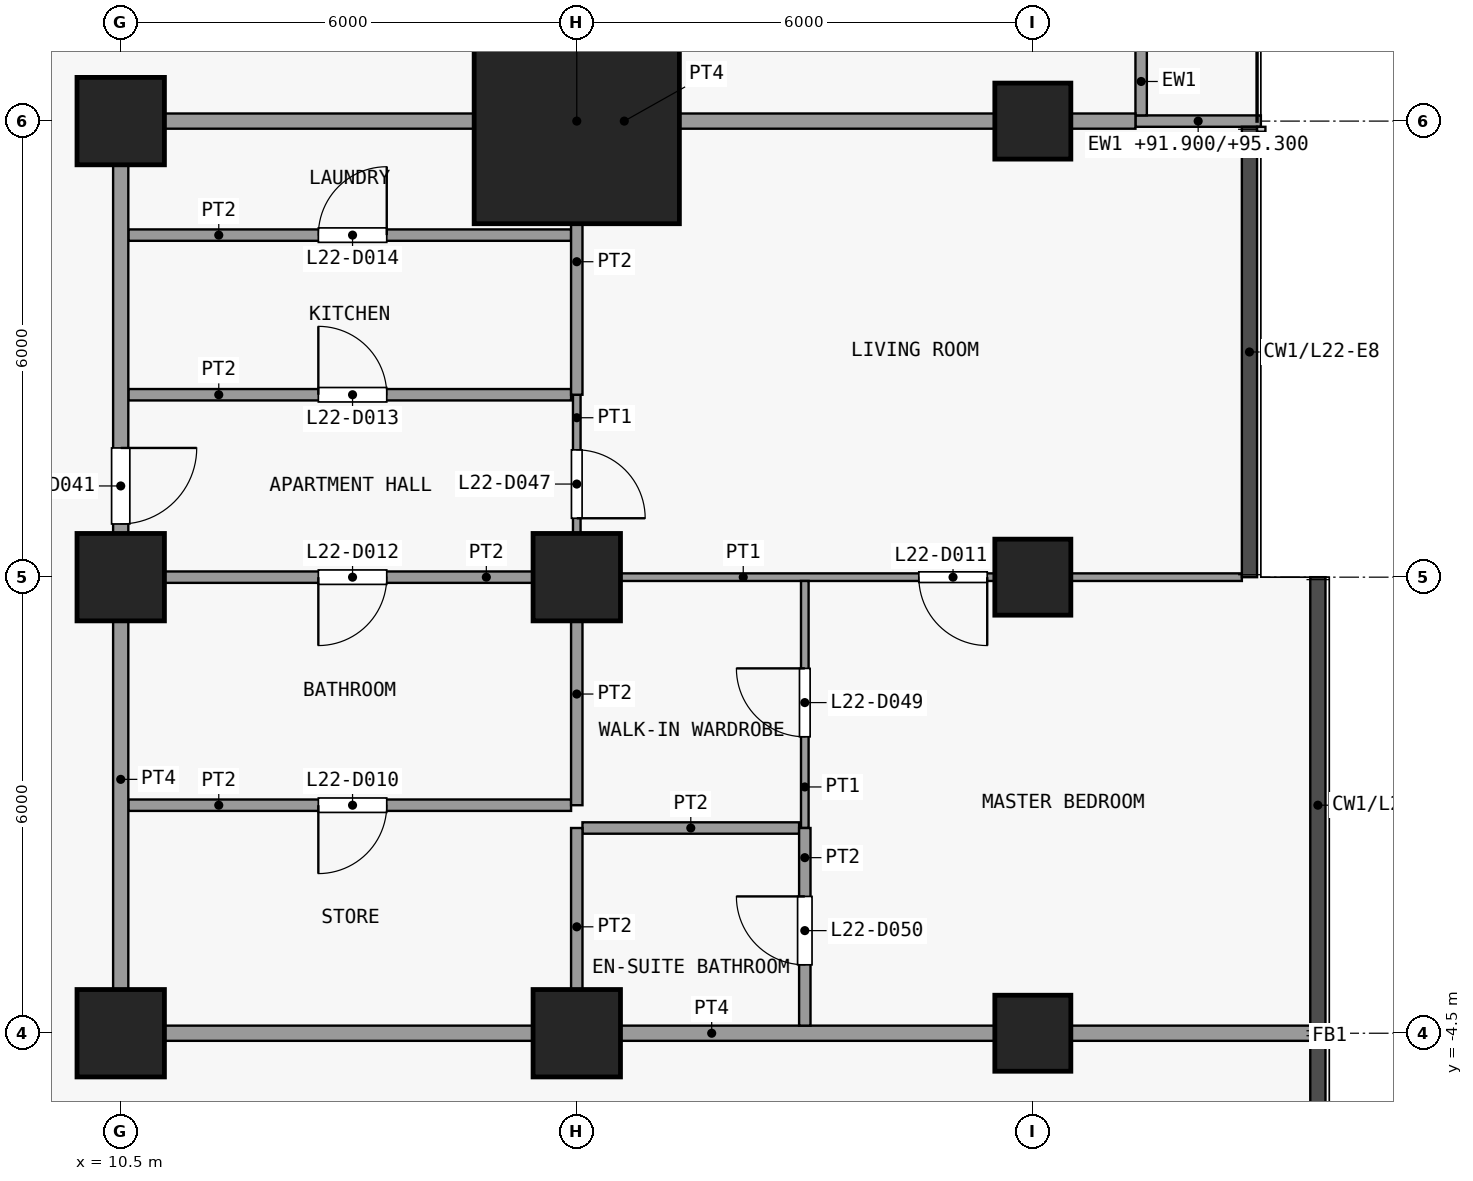
"""IFC4 building model, lengths in metres.
Left out: names, types, materials, properties, quantities, classifications, styles, units other than length and angle.
Written with IfcOpenShell. Run it as: python <this file> out.ifc"""

import sys

from ifc_helpers import new_model, si_unit, direction, frame, frame_2d, origin, origin_2d, place, context, subcontext, project, spatial, rectangle, extrude, element, fill, save


model = new_model("IFC4")
c1 = context("Model", 3, precision=1e-05, world=origin(), true_north=direction((0.0, 1.0)))
c2 = subcontext(c1, "Body", "Model", "MODEL_VIEW")
j1 = project(units=[si_unit("LENGTHUNIT", "METRE"), si_unit("PLANEANGLEUNIT", "RADIAN")], contexts=[c1])
p1 = place(None, origin())
s1 = spatial("IfcSite", under=j1, at=p1, CompositionType="ELEMENT")
p2 = place(p1, origin())
s2 = spatial("IfcBuilding", under=s1, at=p2, CompositionType="ELEMENT")
p3 = place(p2, frame((0.0, 0.0, 91.9)))
s3 = spatial("IfcBuildingStorey", under=s2, at=p3, CompositionType="ELEMENT", Elevation=91.9)
for number, where, z_axis, x_axis in (
    (1, (10.5, -4.5, 0.0), (0.0, 0.0, 1.0), (1.0, 0.0, 0.0)),
    (2, (10.5, 1.5, 0.0), (0.0, 0.0, 1.0), (1.0, 0.0, 0.0)),
    (3, (10.5, 7.5, 0.0), (0.0, 0.0, 1.0), (1.0, 0.0, 0.0)),
    (4, (16.5, -4.5, 0.0), (0.0, 0.0, 1.0), (1.0, 0.0, 0.0)),
    (5, (16.5, 1.5, 0.0), (0.0, 0.0, 1.0), (1.0, 0.0, 0.0)),
):
    element("IfcColumn", number, at=place(p3, frame(where, z_axis=z_axis, x_axis=x_axis)), inside=s3, PredefinedType="COLUMN", context=c2, shape_type="SweptSolid", body=[
        extrude(rectangle(XDim=1.15, YDim=1.15, at=origin_2d()), origin(), (0.0, 0.0, 1.0), 3.6),
    ])
p4 = place(p3, frame((16.5, 7.5, 0.0), z_axis=(0.0, 0.0, 1.0), x_axis=(1.0, 0.0, 0.0)))
e6 = element("IfcColumn", 6, at=p4, inside=s3, PredefinedType="COLUMN", context=c2, shape_type="SweptSolid", body=[
    extrude(rectangle(XDim=2.7, YDim=2.7, at=origin_2d()), origin(), (0.0, 0.0, 1.0), 3.6),
])
for number, where, z_axis, x_axis in (
    (7, (22.5, -4.5, 0.0), (0.0, 0.0, 1.0), (1.0, 0.0, 0.0)),
    (8, (22.5, 1.5, 0.0), (0.0, 0.0, 1.0), (1.0, 0.0, 0.0)),
    (9, (22.5, 7.5, 0.0), (0.0, 0.0, 1.0), (1.0, 0.0, 0.0)),
):
    element("IfcColumn", number, at=place(p3, frame(where, z_axis=z_axis, x_axis=x_axis)), inside=s3, PredefinedType="COLUMN", context=c2, shape_type="SweptSolid", body=[
        extrude(rectangle(XDim=1.0, YDim=1.0, at=origin_2d()), origin(), (0.0, 0.0, 1.0), 3.6),
    ])
p5 = place(p3, frame((23.85, 7.5, 0.0), z_axis=(0.0, 0.0, 1.0), x_axis=(1.0, 0.0, 0.0)))
e10 = element("IfcWall", 10, at=p5, inside=s3, PredefinedType="SOLIDWALL", context=c2, shape_type="SweptSolid", body=[
    extrude(rectangle(XDim=1.65, YDim=0.15, at=frame_2d((0.825, 0.0))), origin(), (0.0, 0.0, 1.0), 3.4),
])
p6 = place(p3, frame((23.925, 13.425, 0.0), z_axis=(0.0, 0.0, 1.0), x_axis=(0.0, -1.0, 0.0)))
e11 = element("IfcWall", 11, at=p6, inside=s3, PredefinedType="SOLIDWALL", context=c2, shape_type="SweptSolid", body=[
    extrude(rectangle(XDim=5.85, YDim=0.15, at=frame_2d((2.925, 0.0))), origin(), (0.0, 0.0, 1.0), 3.3),
])
p7 = place(p6, frame((0.825, 0.0, 0.0)))
e12 = element("IfcOpeningElement", 12, at=p7, cuts=e11, PredefinedType="OPENING", context=c2, shape_type="SweptSolid", body=[
    extrude(rectangle(XDim=1.2, YDim=2.4, at=frame_2d((0.6, 1.2))), frame((0.0, 0.085, 0.0), z_axis=(0.0, -1.0, 0.0), x_axis=(1.0, 0.0, 0.0)), (0.0, 0.0, 1.0), 0.17),
])
p8 = place(p6, frame((3.038, 0.0, 0.9)))
e13 = element("IfcOpeningElement", 13, at=p8, cuts=e11, PredefinedType="OPENING", context=c2, shape_type="SweptSolid", body=[
    extrude(rectangle(XDim=1.8, YDim=2.1, at=frame_2d((0.9, 1.05))), frame((0.0, 0.085, 0.0), z_axis=(0.0, -1.0, 0.0), x_axis=(1.0, 0.0, 0.0)), (0.0, 0.0, 1.0), 0.17),
])
p9 = place(p3, frame((10.4, -4.5, 0.0), z_axis=(0.0, 0.0, 1.0), x_axis=(1.0, 0.0, 0.0)))
e14 = element("IfcWall", 14, at=p9, inside=s3, PredefinedType="PARTITIONING", context=c2, shape_type="SweptSolid", body=[
    extrude(rectangle(XDim=15.75, YDim=0.2, at=frame_2d((7.875, 0.0))), origin(), (0.0, 0.0, 1.0), 3.3),
])
p10 = place(p3, frame((16.575, -1.8, 0.0), z_axis=(0.0, 0.0, 1.0), x_axis=(1.0, 0.0, 0.0)))
e15 = element("IfcWall", 15, at=p10, inside=s3, PredefinedType="PARTITIONING", context=c2, shape_type="SweptSolid", body=[
    extrude(rectangle(XDim=2.85, YDim=0.15, at=frame_2d((1.425, 0.0))), origin(), (0.0, 0.0, 1.0), 3.3),
])
p11 = place(p3, frame((10.6, -1.5, 0.0), z_axis=(0.0, 0.0, 1.0), x_axis=(1.0, 0.0, 0.0)))
e16 = element("IfcWall", 16, at=p11, inside=s3, PredefinedType="PARTITIONING", context=c2, shape_type="SweptSolid", body=[
    extrude(rectangle(XDim=5.825, YDim=0.15, at=frame_2d((2.913, 0.0))), origin(), (0.0, 0.0, 1.0), 3.3),
])
p12 = place(p11, frame((2.5, 0.0, 0.0)))
e17 = element("IfcOpeningElement", 17, at=p12, cuts=e16, PredefinedType="OPENING", context=c2, shape_type="SweptSolid", body=[
    extrude(rectangle(XDim=0.9, YDim=2.1, at=frame_2d((0.45, 1.05))), frame((0.0, 0.085, 0.0), z_axis=(0.0, -1.0, 0.0), x_axis=(1.0, 0.0, 0.0)), (0.0, 0.0, 1.0), 0.17),
])
p13 = place(p3, frame((16.5, 1.5, 0.0), z_axis=(0.0, 0.0, 1.0), x_axis=(1.0, 0.0, 0.0)))
e18 = element("IfcWall", 18, at=p13, inside=s3, PredefinedType="PARTITIONING", context=c2, shape_type="SweptSolid", body=[
    extrude(rectangle(XDim=8.75, YDim=0.1, at=frame_2d((4.375, 0.0))), origin(), (0.0, 0.0, 1.0), 3.3),
])
p14 = place(p13, frame((4.5, 0.0, 0.0)))
e19 = element("IfcOpeningElement", 19, at=p14, cuts=e18, PredefinedType="OPENING", context=c2, shape_type="SweptSolid", body=[
    extrude(rectangle(XDim=0.9, YDim=2.1, at=frame_2d((0.45, 1.05))), frame((0.0, 0.06, 0.0), z_axis=(0.0, -1.0, 0.0), x_axis=(1.0, 0.0, 0.0)), (0.0, 0.0, 1.0), 0.12),
])
p15 = place(p3, frame((10.6, 1.5, 0.0), z_axis=(0.0, 0.0, 1.0), x_axis=(1.0, 0.0, 0.0)))
e20 = element("IfcWall", 20, at=p15, inside=s3, PredefinedType="PARTITIONING", context=c2, shape_type="SweptSolid", body=[
    extrude(rectangle(XDim=5.9, YDim=0.15, at=frame_2d((2.95, 0.0))), origin(), (0.0, 0.0, 1.0), 3.3),
])
p16 = place(p15, frame((2.5, 0.0, 0.0)))
e21 = element("IfcOpeningElement", 21, at=p16, cuts=e20, PredefinedType="OPENING", context=c2, shape_type="SweptSolid", body=[
    extrude(rectangle(XDim=0.9, YDim=2.1, at=frame_2d((0.45, 1.05))), frame((0.0, 0.085, 0.0), z_axis=(0.0, -1.0, 0.0), x_axis=(1.0, 0.0, 0.0)), (0.0, 0.0, 1.0), 0.17),
])
p17 = place(p3, frame((10.6, 3.9, 0.0), z_axis=(0.0, 0.0, 1.0), x_axis=(1.0, 0.0, 0.0)))
e22 = element("IfcWall", 22, at=p17, inside=s3, PredefinedType="PARTITIONING", context=c2, shape_type="SweptSolid", body=[
    extrude(rectangle(XDim=5.825, YDim=0.15, at=frame_2d((2.913, 0.0))), origin(), (0.0, 0.0, 1.0), 3.3),
])
p18 = place(p17, frame((2.5, 0.0, 0.0)))
e23 = element("IfcOpeningElement", 23, at=p18, cuts=e22, PredefinedType="OPENING", context=c2, shape_type="SweptSolid", body=[
    extrude(rectangle(XDim=0.9, YDim=2.1, at=frame_2d((0.45, 1.05))), frame((0.0, 0.085, 0.0), z_axis=(0.0, -1.0, 0.0), x_axis=(1.0, 0.0, 0.0)), (0.0, 0.0, 1.0), 0.17),
])
p19 = place(p3, frame((10.6, 6.0, 0.0), z_axis=(0.0, 0.0, 1.0), x_axis=(1.0, 0.0, 0.0)))
e24 = element("IfcWall", 24, at=p19, inside=s3, PredefinedType="PARTITIONING", context=c2, shape_type="SweptSolid", body=[
    extrude(rectangle(XDim=5.825, YDim=0.15, at=frame_2d((2.913, 0.0))), origin(), (0.0, 0.0, 1.0), 3.3),
])
p20 = place(p19, frame((2.5, 0.0, 0.0)))
e25 = element("IfcOpeningElement", 25, at=p20, cuts=e24, PredefinedType="OPENING", context=c2, shape_type="SweptSolid", body=[
    extrude(rectangle(XDim=0.9, YDim=2.1, at=frame_2d((0.45, 1.05))), frame((0.0, 0.085, 0.0), z_axis=(0.0, -1.0, 0.0), x_axis=(1.0, 0.0, 0.0)), (0.0, 0.0, 1.0), 0.17),
])
p21 = place(p3, frame((10.4, 7.5, 0.0), z_axis=(0.0, 0.0, 1.0), x_axis=(1.0, 0.0, 0.0)))
e26 = element("IfcWall", 26, at=p21, inside=s3, PredefinedType="PARTITIONING", context=c2, shape_type="SweptSolid", body=[
    extrude(rectangle(XDim=13.45, YDim=0.2, at=frame_2d((6.725, 0.0))), origin(), (0.0, 0.0, 1.0), 3.3),
])
p22 = place(p3, frame((10.5, -4.4, 0.0), z_axis=(0.0, 0.0, 1.0), x_axis=(0.0, 1.0, 0.0)))
e27 = element("IfcWall", 27, at=p22, inside=s3, PredefinedType="PARTITIONING", context=c2, shape_type="SweptSolid", body=[
    extrude(rectangle(XDim=11.8, YDim=0.2, at=frame_2d((5.9, 0.0))), origin(), (0.0, 0.0, 1.0), 3.3),
])
p23 = place(p22, frame((6.6, 0.0, 0.0)))
e28 = element("IfcOpeningElement", 28, at=p23, cuts=e27, PredefinedType="OPENING", context=c2, shape_type="SweptSolid", body=[
    extrude(rectangle(XDim=1.0, YDim=2.1, at=frame_2d((0.5, 1.05))), frame((0.0, 0.11, 0.0), z_axis=(0.0, -1.0, 0.0), x_axis=(1.0, 0.0, 0.0)), (0.0, 0.0, 1.0), 0.22),
])
p24 = place(p3, frame((16.5, 1.575, 0.0), z_axis=(0.0, 0.0, 1.0), x_axis=(0.0, 1.0, 0.0)))
e29 = element("IfcWall", 29, at=p24, inside=s3, PredefinedType="PARTITIONING", context=c2, shape_type="SweptSolid", body=[
    extrude(rectangle(XDim=2.325, YDim=0.1, at=frame_2d((1.163, 0.0))), origin(), (0.0, 0.0, 1.0), 3.3),
])
p25 = place(p24, frame((0.7, 0.0, 0.0)))
e30 = element("IfcOpeningElement", 30, at=p25, cuts=e29, PredefinedType="OPENING", context=c2, shape_type="SweptSolid", body=[
    extrude(rectangle(XDim=0.9, YDim=2.1, at=frame_2d((0.45, 1.05))), frame((0.0, 0.06, 0.0), z_axis=(0.0, -1.0, 0.0), x_axis=(1.0, 0.0, 0.0)), (0.0, 0.0, 1.0), 0.12),
])
p26 = place(p3, frame((16.5, -4.4, 0.0), z_axis=(0.0, 0.0, 1.0), x_axis=(0.0, 1.0, 0.0)))
e31 = element("IfcWall", 31, at=p26, inside=s3, PredefinedType="PARTITIONING", context=c2, shape_type="SweptSolid", body=[
    extrude(rectangle(XDim=2.6, YDim=0.15, at=frame_2d((1.3, 0.0))), origin(), (0.0, 0.0, 1.0), 3.3),
])
p27 = place(p3, frame((16.5, -1.5, 0.0), z_axis=(0.0, 0.0, 1.0), x_axis=(0.0, 1.0, 0.0)))
e32 = element("IfcWall", 32, at=p27, inside=s3, PredefinedType="PARTITIONING", context=c2, shape_type="SweptSolid", body=[
    extrude(rectangle(XDim=2.925, YDim=0.15, at=frame_2d((1.462, 0.0))), origin(), (0.0, 0.0, 1.0), 3.3),
])
p28 = place(p3, frame((16.5, 3.9, 0.0), z_axis=(0.0, 0.0, 1.0), x_axis=(0.0, 1.0, 0.0)))
e33 = element("IfcWall", 33, at=p28, inside=s3, PredefinedType="PARTITIONING", context=c2, shape_type="SweptSolid", body=[
    extrude(rectangle(XDim=3.5, YDim=0.15, at=frame_2d((1.75, 0.0))), origin(), (0.0, 0.0, 1.0), 3.3),
])
p29 = place(p3, frame((19.5, -1.8, 0.0), z_axis=(0.0, 0.0, 1.0), x_axis=(0.0, 1.0, 0.0)))
e34 = element("IfcWall", 34, at=p29, inside=s3, PredefinedType="PARTITIONING", context=c2, shape_type="SweptSolid", body=[
    extrude(rectangle(XDim=3.25, YDim=0.1, at=frame_2d((1.625, 0.0))), origin(), (0.0, 0.0, 1.0), 3.3),
])
p30 = place(p29, frame((1.2, 0.0, 0.0)))
e35 = element("IfcOpeningElement", 35, at=p30, cuts=e34, PredefinedType="OPENING", context=c2, shape_type="SweptSolid", body=[
    extrude(rectangle(XDim=0.9, YDim=2.1, at=frame_2d((0.45, 1.05))), frame((0.0, 0.06, 0.0), z_axis=(0.0, -1.0, 0.0), x_axis=(1.0, 0.0, 0.0)), (0.0, 0.0, 1.0), 0.12),
])
p31 = place(p3, frame((19.5, -4.4, 0.0), z_axis=(0.0, 0.0, 1.0), x_axis=(0.0, 1.0, 0.0)))
e36 = element("IfcWall", 36, at=p31, inside=s3, PredefinedType="PARTITIONING", context=c2, shape_type="SweptSolid", body=[
    extrude(rectangle(XDim=2.6, YDim=0.15, at=frame_2d((1.3, 0.0))), origin(), (0.0, 0.0, 1.0), 3.3),
])
p32 = place(p31, frame((0.8, 0.0, 0.0)))
e37 = element("IfcOpeningElement", 37, at=p32, cuts=e36, PredefinedType="OPENING", context=c2, shape_type="SweptSolid", body=[
    extrude(rectangle(XDim=0.9, YDim=2.1, at=frame_2d((0.45, 1.05))), frame((0.0, 0.085, 0.0), z_axis=(0.0, -1.0, 0.0), x_axis=(1.0, 0.0, 0.0)), (0.0, 0.0, 1.0), 0.17),
])
p33 = place(p12, origin())
e38 = element("IfcDoor", 38, at=p33, inside=s3, OperationType="SINGLE_SWING_LEFT", PredefinedType="DOOR", context=c2, shape_type="SweptSolid", body=[
    extrude(rectangle(XDim=0.9, YDim=2.1, at=frame_2d((0.45, 1.05))), frame((0.0, 0.025, 0.0), z_axis=(0.0, -1.0, 0.0), x_axis=(1.0, 0.0, 0.0)), (0.0, 0.0, 1.0), 0.05),
])
fill(e17, e38)
p34 = place(p14, origin())
e39 = element("IfcDoor", 39, at=p34, inside=s3, OperationType="SINGLE_SWING_RIGHT", PredefinedType="DOOR", context=c2, shape_type="SweptSolid", body=[
    extrude(rectangle(XDim=0.9, YDim=2.1, at=frame_2d((0.45, 1.05))), frame((0.0, 0.025, 0.0), z_axis=(0.0, -1.0, 0.0), x_axis=(1.0, 0.0, 0.0)), (0.0, 0.0, 1.0), 0.05),
])
fill(e19, e39)
p35 = place(p16, origin())
e40 = element("IfcDoor", 40, at=p35, inside=s3, OperationType="SINGLE_SWING_LEFT", PredefinedType="DOOR", context=c2, shape_type="SweptSolid", body=[
    extrude(rectangle(XDim=0.9, YDim=2.1, at=frame_2d((0.45, 1.05))), frame((0.0, 0.025, 0.0), z_axis=(0.0, -1.0, 0.0), x_axis=(1.0, 0.0, 0.0)), (0.0, 0.0, 1.0), 0.05),
])
fill(e21, e40)
p36 = place(p18, origin())
e41 = element("IfcDoor", 41, at=p36, inside=s3, OperationType="SINGLE_SWING_RIGHT", PredefinedType="DOOR", context=c2, shape_type="SweptSolid", body=[
    extrude(rectangle(XDim=0.9, YDim=2.1, at=frame_2d((0.45, 1.05))), frame((0.0, 0.025, 0.0), z_axis=(0.0, -1.0, 0.0), x_axis=(1.0, 0.0, 0.0)), (0.0, 0.0, 1.0), 0.05),
])
fill(e23, e41)
p37 = place(p20, origin())
e42 = element("IfcDoor", 42, at=p37, inside=s3, OperationType="SINGLE_SWING_LEFT", PredefinedType="DOOR", context=c2, shape_type="SweptSolid", body=[
    extrude(rectangle(XDim=0.9, YDim=2.1, at=frame_2d((0.45, 1.05))), frame((0.0, 0.025, 0.0), z_axis=(0.0, -1.0, 0.0), x_axis=(1.0, 0.0, 0.0)), (0.0, 0.0, 1.0), 0.05),
])
fill(e25, e42)
p38 = place(p23, origin())
e43 = element("IfcDoor", 43, at=p38, inside=s3, OperationType="SINGLE_SWING_RIGHT", PredefinedType="DOOR", context=c2, shape_type="SweptSolid", body=[
    extrude(rectangle(XDim=1.0, YDim=2.1, at=frame_2d((0.5, 1.05))), frame((0.0, 0.025, 0.0), z_axis=(0.0, -1.0, 0.0), x_axis=(1.0, 0.0, 0.0)), (0.0, 0.0, 1.0), 0.05),
])
fill(e28, e43)
p39 = place(p25, origin())
e44 = element("IfcDoor", 44, at=p39, inside=s3, OperationType="SINGLE_SWING_LEFT", PredefinedType="DOOR", context=c2, shape_type="SweptSolid", body=[
    extrude(rectangle(XDim=0.9, YDim=2.1, at=frame_2d((0.45, 1.05))), frame((0.0, 0.025, 0.0), z_axis=(0.0, -1.0, 0.0), x_axis=(1.0, 0.0, 0.0)), (0.0, 0.0, 1.0), 0.05),
])
fill(e30, e44)
p40 = place(p30, origin())
e45 = element("IfcDoor", 45, at=p40, inside=s3, OperationType="SINGLE_SWING_LEFT", PredefinedType="DOOR", context=c2, shape_type="SweptSolid", body=[
    extrude(rectangle(XDim=0.9, YDim=2.1, at=frame_2d((0.45, 1.05))), frame((0.0, 0.025, 0.0), z_axis=(0.0, -1.0, 0.0), x_axis=(1.0, 0.0, 0.0)), (0.0, 0.0, 1.0), 0.05),
])
fill(e35, e45)
p41 = place(p32, origin())
e46 = element("IfcDoor", 46, at=p41, inside=s3, OperationType="SINGLE_SWING_LEFT", PredefinedType="DOOR", context=c2, shape_type="SweptSolid", body=[
    extrude(rectangle(XDim=0.9, YDim=2.1, at=frame_2d((0.45, 1.05))), frame((0.0, 0.025, 0.0), z_axis=(0.0, -1.0, 0.0), x_axis=(1.0, 0.0, 0.0)), (0.0, 0.0, 1.0), 0.05),
])
fill(e37, e46)
save(model, sys.argv[1])
